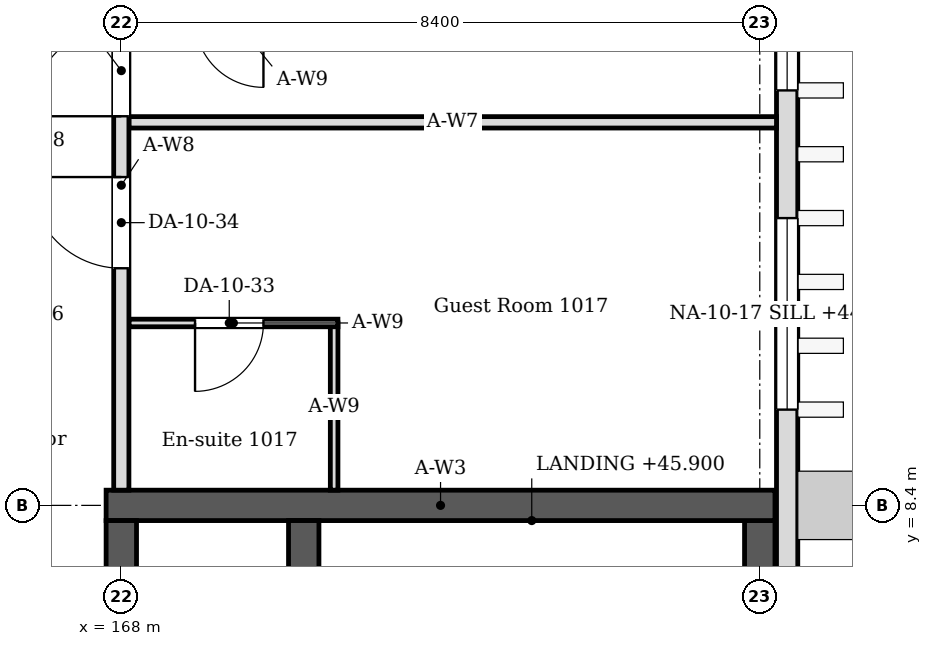
"""IFC4 building model, lengths in metres.
Left out: names, types, materials, properties, quantities, classifications, styles, units other than length and angle.
Written with IfcOpenShell. Run it as: python <this file> out.ifc"""

import sys

from ifc_helpers import new_model, si_unit, direction, frame, frame_2d, origin, place, context, subcontext, project, spatial, rectangle, extrude, element, fill, save


model = new_model("IFC4")
c1 = context("Model", 3, precision=1e-05, world=origin(), true_north=direction((0.0, 1.0)))
c2 = subcontext(c1, "Body", "Model", "MODEL_VIEW")
j1 = project(units=[si_unit("LENGTHUNIT", "METRE"), si_unit("PLANEANGLEUNIT", "RADIAN")], contexts=[c1])
p1 = place(None, origin())
s1 = spatial("IfcSite", under=j1, at=p1, CompositionType="ELEMENT")
p2 = place(p1, origin())
s2 = spatial("IfcBuilding", under=s1, at=p2, CompositionType="ELEMENT")
p3 = place(p2, frame((0.0, 0.0, 43.8)))
s3 = spatial("IfcBuildingStorey", under=s2, at=p3, CompositionType="ELEMENT", Elevation=43.8)
p4 = place(p3, frame((167.8, 8.4, 0.0), z_axis=(0.0, 0.0, 1.0), x_axis=(1.0, 0.0, 0.0)))
e1 = element("IfcWall", 1, at=p4, inside=s3, PredefinedType="SOLIDWALL", context=c2, shape_type="SweptSolid", body=[
    extrude(rectangle(XDim=8.8, YDim=0.4, at=frame_2d((4.4, 0.0))), origin(), (0.0, 0.0, 1.0), 4.05),
])
p5 = place(p3, frame((168.0, 0.2, 0.0), z_axis=(0.0, 0.0, 1.0), x_axis=(0.0, 1.0, 0.0)))
e2 = element("IfcWall", 2, at=p5, inside=s3, PredefinedType="SOLIDWALL", context=c2, shape_type="SweptSolid", body=[
    extrude(rectangle(XDim=8.0, YDim=0.4, at=frame_2d((4.0, 0.0))), origin(), (0.0, 0.0, 1.0), 4.05),
])
p6 = place(p5, frame((1.75, 0.0, 0.0)))
e3 = element("IfcOpeningElement", 3, at=p6, cuts=e2, PredefinedType="OPENING", context=c2, shape_type="SweptSolid", body=[
    extrude(rectangle(XDim=1.0, YDim=2.1, at=frame_2d((0.5, 1.05))), frame((0.0, 0.21, 0.0), z_axis=(0.0, -1.0, 0.0), x_axis=(1.0, 0.0, 0.0)), (0.0, 0.0, 1.0), 0.42),
])
p7 = place(p5, frame((5.675, 0.0, 0.0)))
e4 = element("IfcOpeningElement", 4, at=p7, cuts=e2, PredefinedType="OPENING", context=c2, shape_type="SweptSolid", body=[
    extrude(rectangle(XDim=1.05, YDim=2.1, at=frame_2d((0.525, 1.05))), frame((0.0, 0.21, 0.0), z_axis=(0.0, -1.0, 0.0), x_axis=(1.0, 0.0, 0.0)), (0.0, 0.0, 1.0), 0.42),
])
p8 = place(p3, frame((176.4, 0.2, 0.0), z_axis=(0.0, 0.0, 1.0), x_axis=(0.0, 1.0, 0.0)))
e5 = element("IfcWall", 5, at=p8, inside=s3, PredefinedType="SOLIDWALL", context=c2, shape_type="SweptSolid", body=[
    extrude(rectangle(XDim=8.0, YDim=0.4, at=frame_2d((4.0, 0.0))), origin(), (0.0, 0.0, 1.0), 4.05),
])
p9 = place(p3, frame((176.76, -0.22, 0.0), z_axis=(0.0, 0.0, 1.0), x_axis=(0.0, 1.0, 0.0)))
e6 = element("IfcWall", 6, at=p9, inside=s3, PredefinedType="SOLIDWALL", context=c2, shape_type="SweptSolid", body=[
    extrude(rectangle(XDim=42.57, YDim=0.28, at=frame_2d((21.285, 0.0))), origin(), (0.0, 0.0, 1.0), 4.05),
])
p10 = place(p9, frame((9.88, 0.0, 0.6)))
e7 = element("IfcOpeningElement", 7, at=p10, cuts=e6, PredefinedType="OPENING", context=c2, shape_type="SweptSolid", body=[
    extrude(rectangle(XDim=2.52, YDim=2.4, at=frame_2d((1.26, 1.2))), frame((0.0, 0.15, 0.0), z_axis=(0.0, -1.0, 0.0), x_axis=(1.0, 0.0, 0.0)), (0.0, 0.0, 1.0), 0.3),
])
p11 = place(p9, frame((14.08, 0.0, 0.6)))
e8 = element("IfcOpeningElement", 8, at=p11, cuts=e6, PredefinedType="OPENING", context=c2, shape_type="SweptSolid", body=[
    extrude(rectangle(XDim=2.52, YDim=2.4, at=frame_2d((1.26, 1.2))), frame((0.0, 0.15, 0.0), z_axis=(0.0, -1.0, 0.0), x_axis=(1.0, 0.0, 0.0)), (0.0, 0.0, 1.0), 0.3),
])
p12 = place(p9, frame((17.86, 0.0, 0.6)))
e9 = element("IfcOpeningElement", 9, at=p12, cuts=e6, PredefinedType="OPENING", context=c2, shape_type="SweptSolid", body=[
    extrude(rectangle(XDim=2.52, YDim=2.4, at=frame_2d((1.26, 1.2))), frame((0.0, 0.15, 0.0), z_axis=(0.0, -1.0, 0.0), x_axis=(1.0, 0.0, 0.0)), (0.0, 0.0, 1.0), 0.3),
])
p13 = place(p9, frame((22.06, 0.0, 0.45)))
e10 = element("IfcOpeningElement", 10, at=p13, cuts=e6, PredefinedType="OPENING", context=c2, shape_type="SweptSolid", body=[
    extrude(rectangle(XDim=2.52, YDim=2.1, at=frame_2d((1.26, 1.05))), frame((0.0, 0.15, 0.0), z_axis=(0.0, -1.0, 0.0), x_axis=(1.0, 0.0, 0.0)), (0.0, 0.0, 1.0), 0.3),
])
p14 = place(p3, frame((170.8, 8.6, 0.0), z_axis=(0.0, 0.0, 1.0), x_axis=(0.0, 1.0, 0.0)))
e11 = element("IfcWall", 11, at=p14, inside=s3, PredefinedType="PARTITIONING", context=c2, shape_type="SweptSolid", body=[
    extrude(rectangle(XDim=2.2, YDim=0.1, at=frame_2d((1.1, 0.0))), origin(), (0.0, 0.0, 1.0), 4.05),
])
p15 = place(p3, frame((170.85, 10.8, 0.0), z_axis=(0.0, 0.0, 1.0), x_axis=(-1.0, 0.0, 0.0)))
e12 = element("IfcWall", 12, at=p15, inside=s3, PredefinedType="PARTITIONING", context=c2, shape_type="SweptSolid", body=[
    extrude(rectangle(XDim=2.75, YDim=0.1, at=frame_2d((1.375, 0.0))), origin(), (0.0, 0.0, 1.0), 4.05),
])
p16 = place(p15, frame((0.98, 0.0, 0.0)))
e13 = element("IfcOpeningElement", 13, at=p16, cuts=e12, PredefinedType="OPENING", context=c2, shape_type="SweptSolid", body=[
    extrude(rectangle(XDim=0.9, YDim=2.1, at=frame_2d((0.45, 1.05))), frame((0.0, 0.06, 0.0), z_axis=(0.0, -1.0, 0.0), x_axis=(1.0, 0.0, 0.0)), (0.0, 0.0, 1.0), 0.12),
])
p17 = place(p3, frame((168.1, 13.44, 0.0), z_axis=(0.0, 0.0, 1.0), x_axis=(1.0, 0.0, 0.0)))
e14 = element("IfcWall", 14, at=p17, inside=s3, PredefinedType="PARTITIONING", context=c2, shape_type="SweptSolid", body=[
    extrude(rectangle(XDim=8.52, YDim=0.15, at=frame_2d((4.26, 0.0))), origin(), (0.0, 0.0, 1.0), 3.604),
])
p18 = place(p3, frame((168.0, 8.6, 0.0), z_axis=(0.0, 0.0, 1.0), x_axis=(0.0, 1.0, 0.0)))
e15 = element("IfcWall", 15, at=p18, inside=s3, PredefinedType="PARTITIONING", context=c2, shape_type="SweptSolid", body=[
    extrude(rectangle(XDim=8.025, YDim=0.2, at=frame_2d((4.012, 0.0))), origin(), (0.0, 0.0, 1.0), 3.45),
])
p19 = place(p18, frame((2.92, 0.0, 0.0)))
e16 = element("IfcOpeningElement", 16, at=p19, cuts=e15, PredefinedType="OPENING", context=c2, shape_type="SweptSolid", body=[
    extrude(rectangle(XDim=1.2, YDim=2.1, at=frame_2d((0.6, 1.05))), frame((0.0, 0.11, 0.0), z_axis=(0.0, -1.0, 0.0), x_axis=(1.0, 0.0, 0.0)), (0.0, 0.0, 1.0), 0.22),
])
p20 = place(p18, frame((4.92, 0.0, 0.0)))
e17 = element("IfcOpeningElement", 17, at=p20, cuts=e15, PredefinedType="OPENING", context=c2, shape_type="SweptSolid", body=[
    extrude(rectangle(XDim=1.2, YDim=2.1, at=frame_2d((0.6, 1.05))), frame((0.0, 0.11, 0.0), z_axis=(0.0, -1.0, 0.0), x_axis=(1.0, 0.0, 0.0)), (0.0, 0.0, 1.0), 0.22),
])
p21 = place(p3, frame((170.4, 0.2, 0.0), z_axis=(0.0, 0.0, 1.0), x_axis=(0.0, 1.0, 0.0)))
e18 = element("IfcWall", 18, at=p21, inside=s3, PredefinedType="SOLIDWALL", context=c2, shape_type="SweptSolid", body=[
    extrude(rectangle(XDim=8.0, YDim=0.4, at=frame_2d((4.0, 0.0))), origin(), (0.0, 0.0, 1.0), 4.05),
])
p22 = place(p21, frame((0.3, 0.0, 0.0)))
e19 = element("IfcOpeningElement", 19, at=p22, cuts=e18, PredefinedType="OPENING", context=c2, shape_type="SweptSolid", body=[
    extrude(rectangle(XDim=0.9, YDim=2.1, at=frame_2d((0.45, 1.05))), frame((0.0, 0.21, 0.0), z_axis=(0.0, -1.0, 0.0), x_axis=(1.0, 0.0, 0.0)), (0.0, 0.0, 1.0), 0.42),
])
p23 = place(p10, origin())
e20 = element("IfcWindow", 20, at=p23, inside=s3, PartitioningType="SINGLE_PANEL", PredefinedType="WINDOW", context=c2, shape_type="SweptSolid", body=[
    extrude(rectangle(XDim=2.52, YDim=2.4, at=frame_2d((1.26, 1.2))), frame((0.0, 0.03, 0.0), z_axis=(0.0, -1.0, 0.0), x_axis=(1.0, 0.0, 0.0)), (0.0, 0.0, 1.0), 0.06),
])
fill(e7, e20)
p24 = place(p11, origin())
e21 = element("IfcWindow", 21, at=p24, inside=s3, PartitioningType="SINGLE_PANEL", PredefinedType="WINDOW", context=c2, shape_type="SweptSolid", body=[
    extrude(rectangle(XDim=2.52, YDim=2.4, at=frame_2d((1.26, 1.2))), frame((0.0, 0.03, 0.0), z_axis=(0.0, -1.0, 0.0), x_axis=(1.0, 0.0, 0.0)), (0.0, 0.0, 1.0), 0.06),
])
fill(e8, e21)
p25 = place(p16, origin())
e22 = element("IfcDoor", 22, at=p25, inside=s3, OperationType="SINGLE_SWING_RIGHT", PredefinedType="DOOR", context=c2, shape_type="SweptSolid", body=[
    extrude(rectangle(XDim=0.9, YDim=2.1, at=frame_2d((0.45, 1.05))), frame((0.0, 0.025, 0.0), z_axis=(0.0, -1.0, 0.0), x_axis=(1.0, 0.0, 0.0)), (0.0, 0.0, 1.0), 0.05),
])
fill(e13, e22)
p26 = place(p19, origin())
e23 = element("IfcDoor", 23, at=p26, inside=s3, OperationType="SINGLE_SWING_RIGHT", PredefinedType="DOOR", context=c2, shape_type="SweptSolid", body=[
    extrude(rectangle(XDim=1.2, YDim=2.1, at=frame_2d((0.6, 1.05))), frame((0.0, 0.025, 0.0), z_axis=(0.0, -1.0, 0.0), x_axis=(1.0, 0.0, 0.0)), (0.0, 0.0, 1.0), 0.05),
])
fill(e16, e23)
p27 = place(p20, origin())
e24 = element("IfcDoor", 24, at=p27, inside=s3, OperationType="SINGLE_SWING_LEFT", PredefinedType="DOOR", context=c2, shape_type="SweptSolid", body=[
    extrude(rectangle(XDim=1.2, YDim=2.1, at=frame_2d((0.6, 1.05))), frame((0.0, 0.025, 0.0), z_axis=(0.0, -1.0, 0.0), x_axis=(1.0, 0.0, 0.0)), (0.0, 0.0, 1.0), 0.05),
])
fill(e17, e24)
save(model, sys.argv[1])
